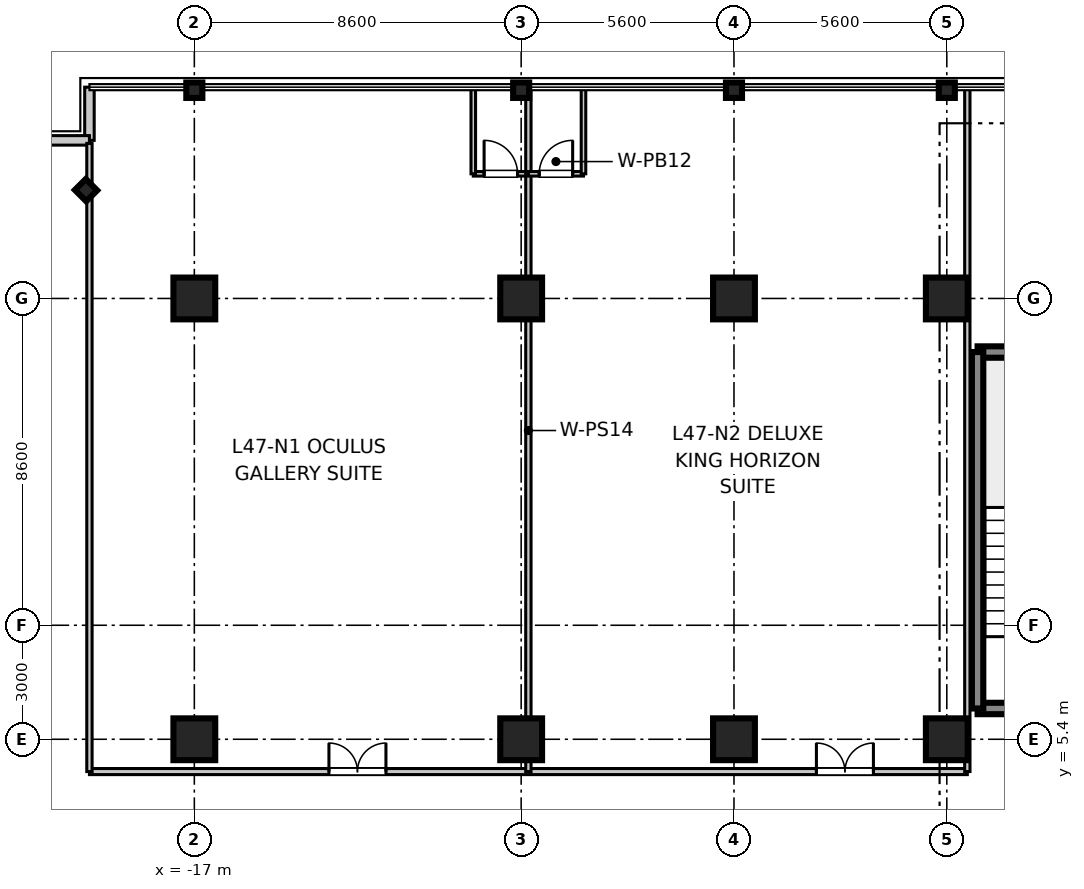
"""IFC4 building model, lengths in metres.
Left out: names, types, materials, properties, quantities, classifications, styles, units other than length and angle.
Written with IfcOpenShell. Run it as: python <this file> out.ifc"""

import sys

from ifc_helpers import new_model, si_unit, direction, frame, frame_2d, origin, origin_2d, place, context, subcontext, project, spatial, rectangle, i_section, extrude, source, transform, mapped, element, fill, save


model = new_model("IFC4")
c1 = context("Model", 3, precision=1e-05, world=origin(), true_north=direction((0.0, 1.0)))
c2 = subcontext(c1, "Body", "Model", "MODEL_VIEW")
j1 = project(units=[si_unit("LENGTHUNIT", "METRE"), si_unit("PLANEANGLEUNIT", "RADIAN")], contexts=[c1])
p1 = place(None, origin())
s1 = spatial("IfcSite", under=j1, at=p1, CompositionType="ELEMENT")
p2 = place(p1, origin())
s2 = spatial("IfcBuilding", under=s1, at=p2, CompositionType="ELEMENT")
p3 = place(p2, frame((0.0, 0.0, 185.5)))
s3 = spatial("IfcBuildingStorey", under=s2, at=p3, CompositionType="ELEMENT", Elevation=185.5)
m1 = source(origin(), c2, "Body", "SweptSolid", [
    extrude(rectangle(XDim=1.1, YDim=1.1, at=origin_2d()), origin(), (0.0, 0.0, 1.0), 3.605),
])
for number, where, z_axis, x_axis in (
    (1, (-17.0, 5.4, 0.0), (0.0, 0.0, 1.0), (1.0, 0.0, 0.0)),
    (2, (-17.0, 17.0, 0.0), (0.0, 0.0, 1.0), (1.0, 0.0, 0.0)),
    (3, (-8.4, 5.4, 0.0), (0.0, 0.0, 1.0), (1.0, 0.0, 0.0)),
    (4, (-8.4, 17.0, 0.0), (0.0, 0.0, 1.0), (1.0, 0.0, 0.0)),
    (5, (-2.8, 5.4, 0.0), (0.0, 0.0, 1.0), (1.0, 0.0, 0.0)),
    (6, (-2.8, 17.0, 0.0), (0.0, 0.0, 1.0), (1.0, 0.0, 0.0)),
    (7, (2.8, 5.4, 0.0), (0.0, 0.0, 1.0), (1.0, 0.0, 0.0)),
    (8, (2.8, 17.0, 0.0), (0.0, 0.0, 1.0), (1.0, 0.0, 0.0)),
):
    element("IfcColumn", number, at=place(p3, frame(where, z_axis=z_axis, x_axis=x_axis)), inside=s3, PredefinedType="COLUMN", context=c2, shape_type="MappedRepresentation", body=[
        mapped(m1, transform((0.0, 0.0, 0.0), scale=1.0)),
    ])
m2 = source(origin(), c2, "Body", "SweptSolid", [
    extrude(i_section(OverallWidth=0.406, OverallDepth=0.422, WebThickness=0.019, FlangeThickness=0.03, at=origin_2d()), origin(), (0.0, 0.0, 1.0), 3.605),
])
for number, where, z_axis, x_axis in (
    (9, (-17.0, 22.48, 0.0), (0.0, 0.0, 1.0), (0.0, 1.0, 0.0)),
    (10, (-8.4, 22.48, 0.0), (0.0, 0.0, 1.0), (0.0, 1.0, 0.0)),
    (11, (-2.8, 22.48, 0.0), (0.0, 0.0, 1.0), (0.0, 1.0, 0.0)),
    (12, (2.8, 22.48, 0.0), (0.0, 0.0, 1.0), (0.0, 1.0, 0.0)),
    (13, (-19.85, 19.85, 0.0), (0.0, 0.0, 1.0), (0.707, 0.707, 0.0)),
):
    element("IfcColumn", number, at=place(p3, frame(where, z_axis=z_axis, x_axis=x_axis)), inside=s3, PredefinedType="COLUMN", context=c2, shape_type="MappedRepresentation", body=[
        mapped(m2, transform((0.0, 0.0, 0.0), scale=1.0)),
    ])
m3 = source(origin(), c2, "Body", "SweptSolid", [
    extrude(rectangle(XDim=3.98, YDim=0.3, at=frame_2d((1.99, 0.0))), origin(), (0.0, 0.0, 1.0), 3.39),
])
for number, where, z_axis, x_axis in (
    (14, (3.61, 6.21, 0.0), (0.0, 0.0, 1.0), (1.0, 0.0, 0.0)),
    (15, (3.61, 15.59, 0.0), (0.0, 0.0, 1.0), (1.0, 0.0, 0.0)),
):
    element("IfcWall", number, at=place(p3, frame(where, z_axis=z_axis, x_axis=x_axis)), inside=s3, PredefinedType="SHEAR", context=c2, shape_type="MappedRepresentation", body=[
        mapped(m3, transform((0.0, 0.0, 0.0), scale=1.0)),
    ])
m4 = source(origin(), c2, "Body", "SweptSolid", [
    extrude(rectangle(XDim=9.38, YDim=0.3, at=frame_2d((4.69, 0.0))), origin(), (0.0, 0.0, 1.0), 3.39),
])
p4 = place(p3, frame((3.61, 6.21, 0.0), z_axis=(0.0, 0.0, 1.0), x_axis=(0.0, 1.0, 0.0)))
e16 = element("IfcWall", 16, at=p4, inside=s3, PredefinedType="SHEAR", context=c2, shape_type="MappedRepresentation", body=[
    mapped(m4, transform((0.0, 0.0, 0.0), scale=1.0)),
])
m5 = source(origin(), c2, "Body", "SweptSolid", [
    extrude(rectangle(XDim=1.4, YDim=0.25, at=frame_2d((0.7, 0.0))), origin(), (0.0, 0.0, 1.0), 3.39),
])
p5 = place(p3, frame((-19.76, 21.16, 0.0), z_axis=(0.0, 0.0, 1.0), x_axis=(0.0, 1.0, 0.0)))
e17 = element("IfcWall", 17, at=p5, inside=s3, PredefinedType="STANDARD", context=c2, shape_type="MappedRepresentation", body=[
    mapped(m5, transform((0.0, 0.0, 0.0), scale=1.0)),
])
m6 = source(origin(), c2, "Body", "SweptSolid", [
    extrude(rectangle(XDim=1.4, YDim=0.25, at=frame_2d((0.7, 0.0))), origin(), (0.0, 0.0, 1.0), 3.39),
])
p6 = place(p3, frame((-21.16, 21.16, 0.0), z_axis=(0.0, 0.0, 1.0), x_axis=(1.0, 0.0, 0.0)))
e18 = element("IfcWall", 18, at=p6, inside=s3, PredefinedType="STANDARD", context=c2, shape_type="MappedRepresentation", body=[
    mapped(m6, transform((0.0, 0.0, 0.0), scale=1.0)),
])
m7 = source(origin(), c2, "Body", "SweptSolid", [
    extrude(rectangle(XDim=23.1, YDim=0.16, at=frame_2d((11.55, 0.0))), origin(), (0.0, 0.0, 1.0), 2.73),
])
p7 = place(p3, frame((-19.76, 4.55, 0.0), z_axis=(0.0, 0.0, 1.0), x_axis=(1.0, 0.0, 0.0)))
e19 = element("IfcWall", 19, at=p7, inside=s3, PredefinedType="PARTITIONING", context=c2, shape_type="MappedRepresentation", body=[
    mapped(m7, transform((0.0, 0.0, 0.0), scale=1.0)),
])
p8 = place(p7, frame((6.302, 0.0, 0.0)))
e20 = element("IfcOpeningElement", 20, at=p8, cuts=e19, PredefinedType="OPENING", context=c2, shape_type="SweptSolid", body=[
    extrude(rectangle(XDim=1.5, YDim=2.15, at=frame_2d((0.75, 1.075))), frame((0.0, 0.09, 0.0), z_axis=(0.0, -1.0, 0.0), x_axis=(1.0, 0.0, 0.0)), (0.0, 0.0, 1.0), 0.18),
])
p9 = place(p7, frame((19.129, 0.0, 0.0)))
e21 = element("IfcOpeningElement", 21, at=p9, cuts=e19, PredefinedType="OPENING", context=c2, shape_type="SweptSolid", body=[
    extrude(rectangle(XDim=1.5, YDim=2.15, at=frame_2d((0.75, 1.075))), frame((0.0, 0.09, 0.0), z_axis=(0.0, -1.0, 0.0), x_axis=(1.0, 0.0, 0.0)), (0.0, 0.0, 1.0), 0.18),
])
m8 = source(origin(), c2, "Body", "SweptSolid", [
    extrude(rectangle(XDim=16.53, YDim=0.14, at=frame_2d((8.265, 0.0))), origin(), (0.0, 0.0, 1.0), 2.73),
])
p10 = place(p3, frame((-19.76, 4.55, 0.0), z_axis=(0.0, 0.0, 1.0), x_axis=(0.0, 1.0, 0.0)))
e22 = element("IfcWall", 22, at=p10, inside=s3, PredefinedType="PARTITIONING", context=c2, shape_type="MappedRepresentation", body=[
    mapped(m8, transform((0.0, 0.0, 0.0), scale=1.0)),
])
m9 = source(origin(), c2, "Body", "SweptSolid", [
    extrude(rectangle(XDim=17.95, YDim=0.14, at=frame_2d((8.975, 0.0))), origin(), (0.0, 0.0, 1.0), 2.73),
])
p11 = place(p3, frame((3.34, 4.55, 0.0), z_axis=(0.0, 0.0, 1.0), x_axis=(0.0, 1.0, 0.0)))
e23 = element("IfcWall", 23, at=p11, inside=s3, PredefinedType="PARTITIONING", context=c2, shape_type="MappedRepresentation", body=[
    mapped(m9, transform((0.0, 0.0, 0.0), scale=1.0)),
])
m10 = source(origin(), c2, "Body", "SweptSolid", [
    extrude(rectangle(XDim=1.45, YDim=0.12, at=frame_2d((0.725, 0.0))), origin(), (0.0, 0.0, 1.0), 2.73),
])
p12 = place(p3, frame((-9.66, 20.28, 0.0), z_axis=(0.0, 0.0, 1.0), x_axis=(1.0, 0.0, 0.0)))
e24 = element("IfcWall", 24, at=p12, inside=s3, PredefinedType="PARTITIONING", context=c2, shape_type="MappedRepresentation", body=[
    mapped(m10, transform((0.0, 0.0, 0.0), scale=1.0)),
])
p13 = place(p12, frame((0.285, 0.0, 0.0)))
e25 = element("IfcOpeningElement", 25, at=p13, cuts=e24, PredefinedType="OPENING", context=c2, shape_type="SweptSolid", body=[
    extrude(rectangle(XDim=0.88, YDim=2.1, at=frame_2d((0.44, 1.05))), frame((0.0, 0.07, 0.0), z_axis=(0.0, -1.0, 0.0), x_axis=(1.0, 0.0, 0.0)), (0.0, 0.0, 1.0), 0.14),
])
m11 = source(origin(), c2, "Body", "SweptSolid", [
    extrude(rectangle(XDim=2.22, YDim=0.12, at=frame_2d((1.11, 0.0))), origin(), (0.0, 0.0, 1.0), 2.73),
])
p14 = place(p3, frame((-9.66, 20.28, 0.0), z_axis=(0.0, 0.0, 1.0), x_axis=(0.0, 1.0, 0.0)))
e26 = element("IfcWall", 26, at=p14, inside=s3, PredefinedType="PARTITIONING", context=c2, shape_type="MappedRepresentation", body=[
    mapped(m11, transform((0.0, 0.0, 0.0), scale=1.0)),
])
p15 = place(p3, frame((-8.21, 4.55, 0.0), z_axis=(0.0, 0.0, 1.0), x_axis=(0.0, 1.0, 0.0)))
e27 = element("IfcWall", 27, at=p15, inside=s3, PredefinedType="PARTITIONING", context=c2, shape_type="MappedRepresentation", body=[
    mapped(m9, transform((0.0, 0.0, 0.0), scale=1.0)),
])
p16 = place(p3, frame((-8.21, 20.28, 0.0), z_axis=(0.0, 0.0, 1.0), x_axis=(1.0, 0.0, 0.0)))
e28 = element("IfcWall", 28, at=p16, inside=s3, PredefinedType="PARTITIONING", context=c2, shape_type="MappedRepresentation", body=[
    mapped(m10, transform((0.0, 0.0, 0.0), scale=1.0)),
])
p17 = place(p16, frame((0.285, 0.0, 0.0)))
e29 = element("IfcOpeningElement", 29, at=p17, cuts=e28, PredefinedType="OPENING", context=c2, shape_type="SweptSolid", body=[
    extrude(rectangle(XDim=0.88, YDim=2.1, at=frame_2d((0.44, 1.05))), frame((0.0, 0.07, 0.0), z_axis=(0.0, -1.0, 0.0), x_axis=(1.0, 0.0, 0.0)), (0.0, 0.0, 1.0), 0.14),
])
p18 = place(p3, frame((-6.76, 20.28, 0.0), z_axis=(0.0, 0.0, 1.0), x_axis=(0.0, 1.0, 0.0)))
e30 = element("IfcWall", 30, at=p18, inside=s3, PredefinedType="PARTITIONING", context=c2, shape_type="MappedRepresentation", body=[
    mapped(m11, transform((0.0, 0.0, 0.0), scale=1.0)),
])
m12 = source(origin(), c2, "Body", "SweptSolid", [
    extrude(rectangle(XDim=0.88, YDim=2.1, at=frame_2d((0.44, 1.05))), frame((0.0, 0.025, 0.0), z_axis=(0.0, -1.0, 0.0), x_axis=(1.0, 0.0, 0.0)), (0.0, 0.0, 1.0), 0.05),
])
p19 = place(p13, origin())
e31 = element("IfcDoor", 31, at=p19, inside=s3, OperationType="SINGLE_SWING_LEFT", PredefinedType="DOOR", context=c2, shape_type="MappedRepresentation", body=[
    mapped(m12, transform((0.0, 0.0, 0.0), scale=1.0)),
])
fill(e25, e31)
m13 = source(origin(), c2, "Body", "SweptSolid", [
    extrude(rectangle(XDim=1.5, YDim=2.15, at=frame_2d((0.75, 1.075))), frame((0.0, 0.025, 0.0), z_axis=(0.0, -1.0, 0.0), x_axis=(1.0, 0.0, 0.0)), (0.0, 0.0, 1.0), 0.05),
])
p20 = place(p8, origin())
e32 = element("IfcDoor", 32, at=p20, inside=s3, OperationType="DOUBLE_DOOR_SINGLE_SWING", PredefinedType="DOOR", context=c2, shape_type="MappedRepresentation", body=[
    mapped(m13, transform((0.0, 0.0, 0.0), scale=1.0)),
])
fill(e20, e32)
p21 = place(p17, origin())
e33 = element("IfcDoor", 33, at=p21, inside=s3, OperationType="SINGLE_SWING_RIGHT", PredefinedType="DOOR", context=c2, shape_type="MappedRepresentation", body=[
    mapped(m12, transform((0.0, 0.0, 0.0), scale=1.0)),
])
fill(e29, e33)
p22 = place(p9, origin())
e34 = element("IfcDoor", 34, at=p22, inside=s3, OperationType="DOUBLE_DOOR_SINGLE_SWING", PredefinedType="DOOR", context=c2, shape_type="MappedRepresentation", body=[
    mapped(m13, transform((0.0, 0.0, 0.0), scale=1.0)),
])
fill(e21, e34)
save(model, sys.argv[1])
